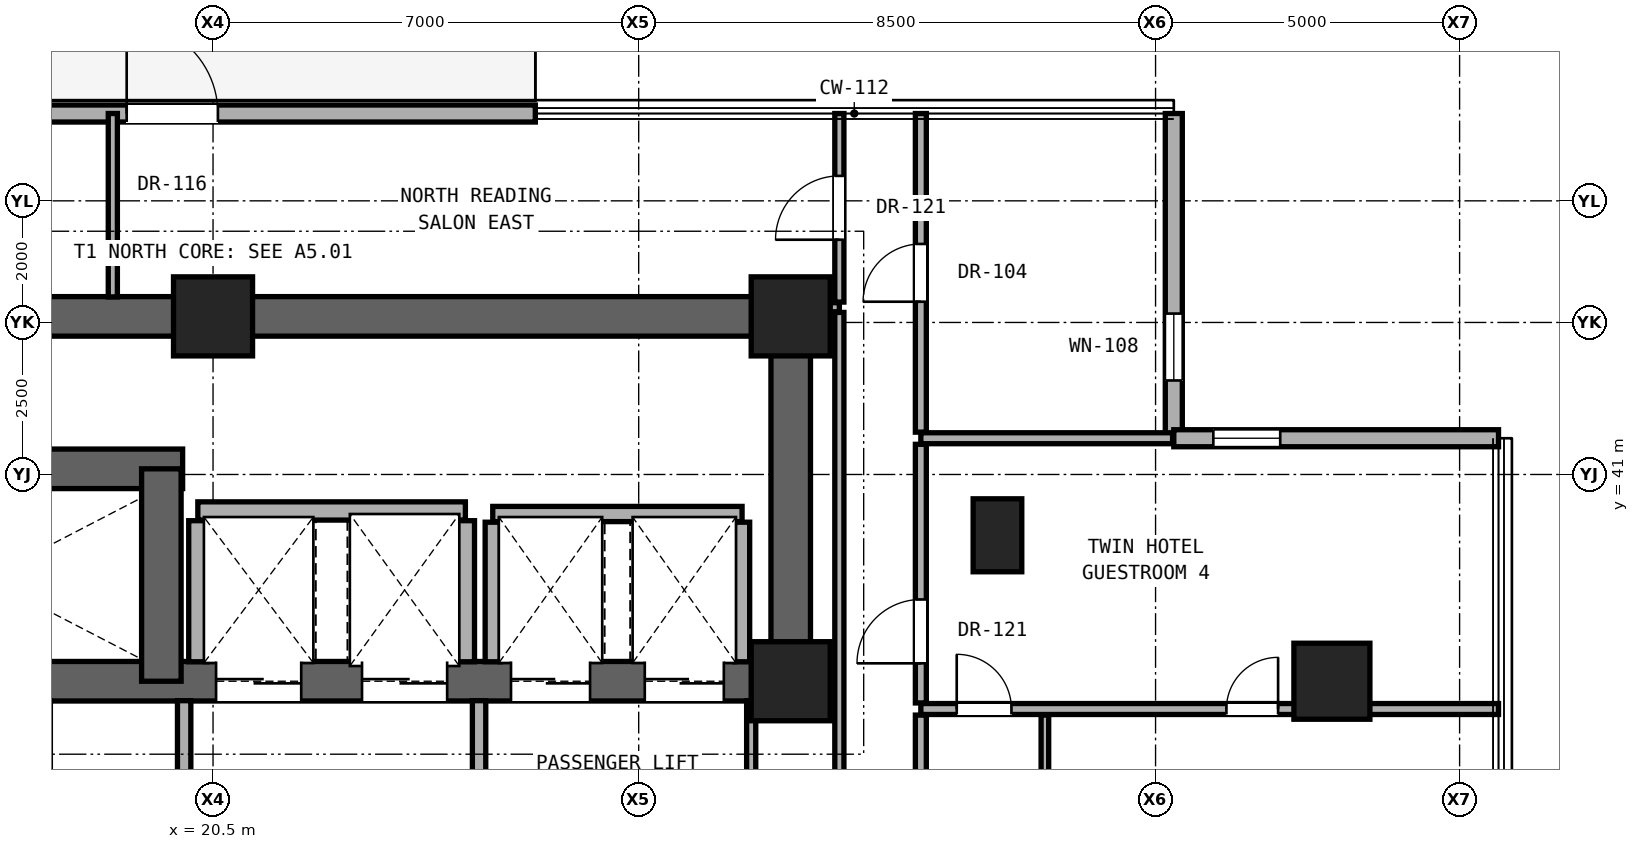
"""IFC4 building model, lengths in metres.
Left out: names, types, materials, properties, quantities, classifications, styles, units other than length and angle.
Written with IfcOpenShell. Run it as: python <this file> out.ifc"""

import sys

from ifc_helpers import new_model, si_unit, direction, frame, frame_2d, origin, origin_2d, place, context, subcontext, project, spatial, rectangle, hollow_rectangle, extrude, element, fill, save


model = new_model("IFC4")
c1 = context("Model", 3, precision=1e-05, world=origin(), true_north=direction((0.0, 1.0)))
c2 = subcontext(c1, "Body", "Model", "MODEL_VIEW")
j1 = project(units=[si_unit("LENGTHUNIT", "METRE"), si_unit("PLANEANGLEUNIT", "RADIAN")], contexts=[c1])
p1 = place(None, origin())
s1 = spatial("IfcSite", under=j1, at=p1, CompositionType="ELEMENT")
p2 = place(p1, origin())
s2 = spatial("IfcBuilding", under=s1, at=p2, CompositionType="ELEMENT")
p3 = place(p2, frame((0.0, 0.0, 58.7)))
s3 = spatial("IfcBuildingStorey", under=s2, at=p3, CompositionType="ELEMENT", Elevation=58.7)
for number, where, z_axis, x_axis in (
    (1, (30.0, 37.6, 0.0), (0.0, 0.0, 1.0), (1.0, 0.0, 0.0)),
    (2, (20.5, 43.6, 0.0), (0.0, 0.0, 1.0), (1.0, 0.0, 0.0)),
    (3, (30.0, 43.6, 0.0), (0.0, 0.0, 1.0), (1.0, 0.0, 0.0)),
):
    element("IfcColumn", number, at=place(p3, frame(where, z_axis=z_axis, x_axis=x_axis)), inside=s3, PredefinedType="COLUMN", context=c2, shape_type="SweptSolid", body=[
        extrude(rectangle(XDim=1.3, YDim=1.3, at=origin_2d()), origin(), (0.0, 0.0, 1.0), 3.3),
    ])
p4 = place(p3, frame((38.9, 37.6, 0.0), z_axis=(0.0, 0.0, 1.0), x_axis=(1.0, 0.0, 0.0)))
e4 = element("IfcColumn", 4, at=p4, inside=s3, PredefinedType="COLUMN", context=c2, shape_type="SweptSolid", body=[
    extrude(hollow_rectangle(XDim=1.25, YDim=1.25, WallThickness=0.07, at=origin_2d()), origin(), (0.0, 0.0, 1.0), 3.3),
])
p5 = place(p3, frame((33.4, 40.0, 0.0), z_axis=(0.0, 0.0, 1.0), x_axis=(1.0, 0.0, 0.0)))
e5 = element("IfcColumn", 5, at=p5, inside=s3, PredefinedType="PILASTER", context=c2, shape_type="SweptSolid", body=[
    extrude(rectangle(XDim=0.8, YDim=1.2, at=origin_2d()), origin(), (0.0, 0.0, 1.0), 3.3),
])
p6 = place(p3, frame((11.0, 43.6, 0.0), z_axis=(0.0, 0.0, 1.0), x_axis=(1.0, 0.0, 0.0)))
e6 = element("IfcWall", 6, at=p6, inside=s3, PredefinedType="SHEAR", context=c2, shape_type="SweptSolid", body=[
    extrude(rectangle(XDim=19.0, YDim=0.65, at=frame_2d((9.5, 0.0))), origin(), (0.0, 0.0, 1.0), 3.06),
])
p7 = place(p3, frame((30.0, 37.6, 0.0), z_axis=(0.0, 0.0, 1.0), x_axis=(0.0, 1.0, 0.0)))
e7 = element("IfcWall", 7, at=p7, inside=s3, PredefinedType="SHEAR", context=c2, shape_type="SweptSolid", body=[
    extrude(rectangle(XDim=6.0, YDim=0.65, at=frame_2d((3.0, 0.0))), origin(), (0.0, 0.0, 1.0), 3.06),
])
p8 = place(p3, frame((11.0, 37.6, 0.0), z_axis=(0.0, 0.0, 1.0), x_axis=(1.0, 0.0, 0.0)))
e8 = element("IfcWall", 8, at=p8, inside=s3, PredefinedType="SHEAR", context=c2, shape_type="SweptSolid", body=[
    extrude(rectangle(XDim=19.0, YDim=0.65, at=frame_2d((9.5, 0.0))), origin(), (0.0, 0.0, 1.0), 3.06),
])
p9 = place(p8, frame((1.06, 0.0, 0.0)))
e9 = element("IfcOpeningElement", 9, at=p9, cuts=e8, PredefinedType="OPENING", context=c2, shape_type="SweptSolid", body=[
    extrude(rectangle(XDim=1.15, YDim=2.2, at=frame_2d((0.575, 1.1))), frame((0.0, 0.335, 0.0), z_axis=(0.0, -1.0, 0.0), x_axis=(1.0, 0.0, 0.0)), (0.0, 0.0, 1.0), 0.67),
])
p10 = place(p8, frame((9.55, 0.0, 0.0)))
e10 = element("IfcOpeningElement", 10, at=p10, cuts=e8, PredefinedType="OPENING", context=c2, shape_type="SweptSolid", body=[
    extrude(rectangle(XDim=1.4, YDim=2.35, at=frame_2d((0.7, 1.175))), frame((0.0, 0.335, 0.0), z_axis=(0.0, -1.0, 0.0), x_axis=(1.0, 0.0, 0.0)), (0.0, 0.0, 1.0), 0.67),
])
p11 = place(p8, frame((11.95, 0.0, 0.0)))
e11 = element("IfcOpeningElement", 11, at=p11, cuts=e8, PredefinedType="OPENING", context=c2, shape_type="SweptSolid", body=[
    extrude(rectangle(XDim=1.4, YDim=2.35, at=frame_2d((0.7, 1.175))), frame((0.0, 0.335, 0.0), z_axis=(0.0, -1.0, 0.0), x_axis=(1.0, 0.0, 0.0)), (0.0, 0.0, 1.0), 0.67),
])
p12 = place(p8, frame((14.4, 0.0, 0.0)))
e12 = element("IfcOpeningElement", 12, at=p12, cuts=e8, PredefinedType="OPENING", context=c2, shape_type="SweptSolid", body=[
    extrude(rectangle(XDim=1.3, YDim=2.3, at=frame_2d((0.65, 1.15))), frame((0.0, 0.335, 0.0), z_axis=(0.0, -1.0, 0.0), x_axis=(1.0, 0.0, 0.0)), (0.0, 0.0, 1.0), 0.67),
])
p13 = place(p8, frame((16.6, 0.0, 0.0)))
e13 = element("IfcOpeningElement", 13, at=p13, cuts=e8, PredefinedType="OPENING", context=c2, shape_type="SweptSolid", body=[
    extrude(rectangle(XDim=1.3, YDim=2.3, at=frame_2d((0.65, 1.15))), frame((0.0, 0.335, 0.0), z_axis=(0.0, -1.0, 0.0), x_axis=(1.0, 0.0, 0.0)), (0.0, 0.0, 1.0), 0.67),
])
p14 = place(p3, frame((11.0, 41.093, 0.0), z_axis=(0.0, 0.0, 1.0), x_axis=(1.0, 0.0, 0.0)))
e14 = element("IfcWall", 14, at=p14, inside=s3, PredefinedType="SHEAR", context=c2, shape_type="SweptSolid", body=[
    extrude(rectangle(XDim=9.0, YDim=0.65, at=frame_2d((4.5, 0.0))), origin(), (0.0, 0.0, 1.0), 3.06),
])
p15 = place(p3, frame((19.65, 37.6, 0.0), z_axis=(0.0, 0.0, 1.0), x_axis=(0.0, 1.0, 0.0)))
e15 = element("IfcWall", 15, at=p15, inside=s3, PredefinedType="SHEAR", context=c2, shape_type="SweptSolid", body=[
    extrude(rectangle(XDim=3.493, YDim=0.65, at=frame_2d((1.747, 0.0))), origin(), (0.0, 0.0, 1.0), 3.06),
])
p16 = place(p3, frame((15.2, 46.936, 0.0), z_axis=(0.0, 0.0, 1.0), x_axis=(1.0, 0.0, 0.0)))
e16 = element("IfcWall", 16, at=p16, inside=s3, PredefinedType="SOLIDWALL", context=c2, shape_type="SweptSolid", body=[
    extrude(rectangle(XDim=10.6, YDim=0.28, at=frame_2d((5.3, 0.0))), origin(), (0.0, 0.0, 1.0), 3.02),
])
p17 = place(p16, frame((0.55, 0.0, 0.67)))
e17 = element("IfcOpeningElement", 17, at=p17, cuts=e16, PredefinedType="OPENING", context=c2, shape_type="SweptSolid", body=[
    extrude(rectangle(XDim=1.65, YDim=2.2, at=frame_2d((0.825, 1.1))), frame((0.0, 0.15, 0.0), z_axis=(0.0, -1.0, 0.0), x_axis=(1.0, 0.0, 0.0)), (0.0, 0.0, 1.0), 0.3),
])
p18 = place(p16, frame((3.88, 0.0, 0.0)))
e18 = element("IfcOpeningElement", 18, at=p18, cuts=e16, PredefinedType="OPENING", context=c2, shape_type="SweptSolid", body=[
    extrude(rectangle(XDim=1.5, YDim=2.3, at=frame_2d((0.75, 1.15))), frame((0.0, 0.15, 0.0), z_axis=(0.0, -1.0, 0.0), x_axis=(1.0, 0.0, 0.0)), (0.0, 0.0, 1.0), 0.3),
])
p19 = place(p3, frame((36.3, 41.596, 0.0), z_axis=(0.0, 0.0, 1.0), x_axis=(0.0, 1.0, 0.0)))
e19 = element("IfcWall", 19, at=p19, inside=s3, PredefinedType="SOLIDWALL", context=c2, shape_type="SweptSolid", body=[
    extrude(rectangle(XDim=5.34, YDim=0.28, at=frame_2d((2.67, 0.0))), origin(), (0.0, 0.0, 1.0), 3.04),
])
p20 = place(p19, frame((0.95, 0.0, 0.85)))
e20 = element("IfcOpeningElement", 20, at=p20, cuts=e19, PredefinedType="OPENING", context=c2, shape_type="SweptSolid", body=[
    extrude(rectangle(XDim=1.1, YDim=2.0, at=frame_2d((0.55, 1.0))), frame((0.0, 0.15, 0.0), z_axis=(0.0, -1.0, 0.0), x_axis=(1.0, 0.0, 0.0)), (0.0, 0.0, 1.0), 0.3),
])
p21 = place(p3, frame((41.64, 41.596, 0.0), z_axis=(0.0, 0.0, 1.0), x_axis=(-1.0, 0.0, 0.0)))
e21 = element("IfcWall", 21, at=p21, inside=s3, PredefinedType="SOLIDWALL", context=c2, shape_type="SweptSolid", body=[
    extrude(rectangle(XDim=5.34, YDim=0.28, at=frame_2d((2.67, 0.0))), origin(), (0.0, 0.0, 1.0), 3.04),
])
p22 = place(p21, frame((3.59, 0.0, 0.85)))
e22 = element("IfcOpeningElement", 22, at=p22, cuts=e21, PredefinedType="OPENING", context=c2, shape_type="SweptSolid", body=[
    extrude(rectangle(XDim=1.1, YDim=2.0, at=frame_2d((0.55, 1.0))), frame((0.0, 0.15, 0.0), z_axis=(0.0, -1.0, 0.0), x_axis=(1.0, 0.0, 0.0)), (0.0, 0.0, 1.0), 0.3),
])
p23 = place(p3, frame((32.14, 37.143, 0.0), z_axis=(0.0, 0.0, 1.0), x_axis=(1.0, 0.0, 0.0)))
e23 = element("IfcWall", 23, at=p23, inside=s3, PredefinedType="PARTITIONING", context=c2, shape_type="SweptSolid", body=[
    extrude(rectangle(XDim=9.5, YDim=0.18, at=frame_2d((4.75, 0.0))), origin(), (0.0, 0.0, 1.0), 2.125),
])
p24 = place(p23, frame((5.025, 0.0, 0.0)))
e24 = element("IfcOpeningElement", 24, at=p24, cuts=e23, PredefinedType="OPENING", context=c2, shape_type="SweptSolid", body=[
    extrude(rectangle(XDim=0.85, YDim=2.01, at=frame_2d((0.425, 1.005))), frame((0.0, 0.1, 0.0), z_axis=(0.0, -1.0, 0.0), x_axis=(1.0, 0.0, 0.0)), (0.0, 0.0, 1.0), 0.2),
])
p25 = place(p23, frame((0.59, 0.0, 0.0)))
e25 = element("IfcOpeningElement", 25, at=p25, cuts=e23, PredefinedType="OPENING", context=c2, shape_type="SweptSolid", body=[
    extrude(rectangle(XDim=0.9, YDim=2.1, at=frame_2d((0.45, 1.05))), frame((0.0, 0.1, 0.0), z_axis=(0.0, -1.0, 0.0), x_axis=(1.0, 0.0, 0.0)), (0.0, 0.0, 1.0), 0.2),
])
p26 = place(p3, frame((25.1, 40.35, 0.0), z_axis=(0.0, 0.0, 1.0), x_axis=(1.0, 0.0, 0.0)))
e26 = element("IfcWall", 26, at=p26, inside=s3, PredefinedType="SOLIDWALL", context=c2, shape_type="SweptSolid", body=[
    extrude(rectangle(XDim=4.1, YDim=0.25, at=frame_2d((2.05, 0.0))), origin(), (0.0, 0.0, 1.0), 3.06),
])
p27 = place(p3, frame((20.25, 40.4, 0.0), z_axis=(0.0, 0.0, 1.0), x_axis=(1.0, 0.0, 0.0)))
e27 = element("IfcWall", 27, at=p27, inside=s3, PredefinedType="SOLIDWALL", context=c2, shape_type="SweptSolid", body=[
    extrude(rectangle(XDim=4.4, YDim=0.3, at=frame_2d((2.2, 0.0))), origin(), (0.0, 0.0, 1.0), 3.06),
])
p28 = place(p3, frame((32.14, 41.596, 0.0), z_axis=(0.0, 0.0, 1.0), x_axis=(1.0, 0.0, 0.0)))
e28 = element("IfcWall", 28, at=p28, inside=s3, PredefinedType="PARTITIONING", context=c2, shape_type="SweptSolid", body=[
    extrude(rectangle(XDim=4.14, YDim=0.18, at=frame_2d((2.07, 0.0))), origin(), (0.0, 0.0, 1.0), 3.06),
])
p29 = place(p3, frame((30.32, 43.75, 0.0), z_axis=(0.0, 0.0, 1.0), x_axis=(1.0, 0.0, 0.0)))
e29 = element("IfcWall", 29, at=p29, inside=s3, PredefinedType="PARTITIONING", context=c2, shape_type="SweptSolid", body=[
    extrude(rectangle(XDim=0.48, YDim=0.15, at=frame_2d((0.24, 0.0))), origin(), (0.0, 0.0, 1.0), 3.06),
])
p30 = place(p3, frame((18.852, 43.92, 0.0), z_axis=(0.0, 0.0, 1.0), x_axis=(0.0, 1.0, 0.0)))
e30 = element("IfcWall", 30, at=p30, inside=s3, PredefinedType="PARTITIONING", context=c2, shape_type="SweptSolid", body=[
    extrude(rectangle(XDim=3.016, YDim=0.15, at=frame_2d((1.508, 0.0))), origin(), (0.0, 0.0, 1.0), 3.06),
])
p31 = place(p3, frame((20.025, 34.57, 0.0), z_axis=(0.0, 0.0, 1.0), x_axis=(0.0, 1.0, 0.0)))
e31 = element("IfcWall", 31, at=p31, inside=s3, PredefinedType="SOLIDWALL", context=c2, shape_type="SweptSolid", body=[
    extrude(rectangle(XDim=2.71, YDim=0.22, at=frame_2d((1.355, 0.0))), origin(), (0.0, 0.0, 1.0), 3.06),
])
for number, where, z_axis, x_axis in (
    (32, (20.25, 37.92, 0.0), (0.0, 0.0, 1.0), (0.0, 1.0, 0.0)),
    (33, (24.65, 37.92, 0.0), (0.0, 0.0, 1.0), (0.0, 1.0, 0.0)),
):
    element("IfcWall", number, at=place(p3, frame(where, z_axis=z_axis, x_axis=x_axis)), inside=s3, PredefinedType="SOLIDWALL", context=c2, shape_type="SweptSolid", body=[
        extrude(rectangle(XDim=2.32, YDim=0.3, at=frame_2d((1.16, 0.0))), origin(), (0.0, 0.0, 1.0), 3.06),
    ])
p32 = place(p3, frame((24.875, 34.57, 0.0), z_axis=(0.0, 0.0, 1.0), x_axis=(0.0, 1.0, 0.0)))
e34 = element("IfcWall", 34, at=p32, inside=s3, PredefinedType="SOLIDWALL", context=c2, shape_type="SweptSolid", body=[
    extrude(rectangle(XDim=2.71, YDim=0.22, at=frame_2d((1.355, 0.0))), origin(), (0.0, 0.0, 1.0), 3.06),
])
p33 = place(p3, frame((25.1, 37.92, 0.0), z_axis=(0.0, 0.0, 1.0), x_axis=(0.0, 1.0, 0.0)))
e35 = element("IfcWall", 35, at=p33, inside=s3, PredefinedType="SOLIDWALL", context=c2, shape_type="SweptSolid", body=[
    extrude(rectangle(XDim=2.295, YDim=0.25, at=frame_2d((1.147, 0.0))), origin(), (0.0, 0.0, 1.0), 3.06),
])
p34 = place(p3, frame((29.35, 34.57, 0.0), z_axis=(0.0, 0.0, 1.0), x_axis=(0.0, 1.0, 0.0)))
e36 = element("IfcWall", 36, at=p34, inside=s3, PredefinedType="PARTITIONING", context=c2, shape_type="SweptSolid", body=[
    extrude(rectangle(XDim=2.71, YDim=0.15, at=frame_2d((1.355, 0.0))), origin(), (0.0, 0.0, 1.0), 3.06),
])
p35 = place(p3, frame((29.2, 37.92, 0.0), z_axis=(0.0, 0.0, 1.0), x_axis=(0.0, 1.0, 0.0)))
e37 = element("IfcWall", 37, at=p35, inside=s3, PredefinedType="SOLIDWALL", context=c2, shape_type="SweptSolid", body=[
    extrude(rectangle(XDim=2.295, YDim=0.25, at=frame_2d((1.147, 0.0))), origin(), (0.0, 0.0, 1.0), 3.06),
])
p36 = place(p3, frame((30.8, 34.57, 0.0), z_axis=(0.0, 0.0, 1.0), x_axis=(0.0, 1.0, 0.0)))
e38 = element("IfcWall", 38, at=p36, inside=s3, PredefinedType="PARTITIONING", context=c2, shape_type="SweptSolid", body=[
    extrude(rectangle(XDim=9.095, YDim=0.15, at=frame_2d((4.547, 0.0))), origin(), (0.0, 0.0, 1.0), 2.436),
])
p37 = place(p3, frame((30.8, 43.835, 0.0), z_axis=(0.0, 0.0, 1.0), x_axis=(0.0, 1.0, 0.0)))
e39 = element("IfcWall", 39, at=p37, inside=s3, PredefinedType="PARTITIONING", context=c2, shape_type="SweptSolid", body=[
    extrude(rectangle(XDim=3.101, YDim=0.15, at=frame_2d((1.551, 0.0))), origin(), (0.0, 0.0, 1.0), 3.06),
])
p38 = place(p37, frame((1.025, 0.0, 0.0)))
e40 = element("IfcOpeningElement", 40, at=p38, cuts=e39, PredefinedType="OPENING", context=c2, shape_type="SweptSolid", body=[
    extrude(rectangle(XDim=1.05, YDim=2.2, at=frame_2d((0.525, 1.1))), frame((0.0, 0.085, 0.0), z_axis=(0.0, -1.0, 0.0), x_axis=(1.0, 0.0, 0.0)), (0.0, 0.0, 1.0), 0.17),
])
p39 = place(p3, frame((32.14, 34.496, 0.0), z_axis=(0.0, 0.0, 1.0), x_axis=(0.0, 1.0, 0.0)))
e41 = element("IfcWall", 41, at=p39, inside=s3, PredefinedType="PARTITIONING", context=c2, shape_type="SweptSolid", body=[
    extrude(rectangle(XDim=2.547, YDim=0.18, at=frame_2d((1.274, 0.0))), origin(), (0.0, 0.0, 1.0), 3.06),
])
p40 = place(p3, frame((32.14, 37.243, 0.0), z_axis=(0.0, 0.0, 1.0), x_axis=(0.0, 1.0, 0.0)))
e42 = element("IfcWall", 42, at=p40, inside=s3, PredefinedType="PARTITIONING", context=c2, shape_type="SweptSolid", body=[
    extrude(rectangle(XDim=4.253, YDim=0.18, at=frame_2d((2.126, 0.0))), origin(), (0.0, 0.0, 1.0), 2.436),
])
p41 = place(p40, frame((0.652, 0.0, 0.0)))
e43 = element("IfcOpeningElement", 43, at=p41, cuts=e42, PredefinedType="OPENING", context=c2, shape_type="SweptSolid", body=[
    extrude(rectangle(XDim=1.05, YDim=2.2, at=frame_2d((0.525, 1.1))), frame((0.0, 0.1, 0.0), z_axis=(0.0, -1.0, 0.0), x_axis=(1.0, 0.0, 0.0)), (0.0, 0.0, 1.0), 0.2),
])
p42 = place(p3, frame((32.14, 41.696, 0.0), z_axis=(0.0, 0.0, 1.0), x_axis=(0.0, 1.0, 0.0)))
e44 = element("IfcWall", 44, at=p42, inside=s3, PredefinedType="PARTITIONING", context=c2, shape_type="SweptSolid", body=[
    extrude(rectangle(XDim=5.24, YDim=0.18, at=frame_2d((2.62, 0.0))), origin(), (0.0, 0.0, 1.0), 3.06),
])
p43 = place(p42, frame((2.145, 0.0, 0.0)))
e45 = element("IfcOpeningElement", 45, at=p43, cuts=e44, PredefinedType="OPENING", context=c2, shape_type="SweptSolid", body=[
    extrude(rectangle(XDim=0.95, YDim=2.15, at=frame_2d((0.475, 1.075))), frame((0.0, 0.1, 0.0), z_axis=(0.0, -1.0, 0.0), x_axis=(1.0, 0.0, 0.0)), (0.0, 0.0, 1.0), 0.2),
])
p44 = place(p3, frame((34.18, 34.496, 0.0), z_axis=(0.0, 0.0, 1.0), x_axis=(0.0, 1.0, 0.0)))
e46 = element("IfcWall", 46, at=p44, inside=s3, PredefinedType="PARTITIONING", context=c2, shape_type="SweptSolid", body=[
    extrude(rectangle(XDim=2.547, YDim=0.125, at=frame_2d((1.274, 0.0))), origin(), (0.0, 0.0, 1.0), 3.06),
])
p45 = place(p18, origin())
e47 = element("IfcDoor", 47, at=p45, inside=s3, OperationType="SINGLE_SWING_LEFT", PredefinedType="DOOR", context=c2, shape_type="SweptSolid", body=[
    extrude(rectangle(XDim=1.5, YDim=2.3, at=frame_2d((0.75, 1.15))), frame((0.0, 0.025, 0.0), z_axis=(0.0, -1.0, 0.0), x_axis=(1.0, 0.0, 0.0)), (0.0, 0.0, 1.0), 0.05),
])
fill(e18, e47)
p46 = place(p20, origin())
e48 = element("IfcWindow", 48, at=p46, inside=s3, PartitioningType="SINGLE_PANEL", PredefinedType="WINDOW", context=c2, shape_type="SweptSolid", body=[
    extrude(rectangle(XDim=1.1, YDim=2.0, at=frame_2d((0.55, 1.0))), frame((0.0, 0.03, 0.0), z_axis=(0.0, -1.0, 0.0), x_axis=(1.0, 0.0, 0.0)), (0.0, 0.0, 1.0), 0.06),
])
fill(e20, e48)
p47 = place(p22, origin())
e49 = element("IfcWindow", 49, at=p47, inside=s3, PartitioningType="SINGLE_PANEL", PredefinedType="WINDOW", context=c2, shape_type="SweptSolid", body=[
    extrude(rectangle(XDim=1.1, YDim=2.0, at=frame_2d((0.55, 1.0))), frame((0.0, 0.03, 0.0), z_axis=(0.0, -1.0, 0.0), x_axis=(1.0, 0.0, 0.0)), (0.0, 0.0, 1.0), 0.06),
])
fill(e22, e49)
p48 = place(p41, origin())
e50 = element("IfcDoor", 50, at=p48, inside=s3, OperationType="SINGLE_SWING_LEFT", PredefinedType="DOOR", context=c2, shape_type="SweptSolid", body=[
    extrude(rectangle(XDim=1.05, YDim=2.2, at=frame_2d((0.525, 1.1))), frame((0.0, 0.025, 0.0), z_axis=(0.0, -1.0, 0.0), x_axis=(1.0, 0.0, 0.0)), (0.0, 0.0, 1.0), 0.05),
])
fill(e43, e50)
p49 = place(p24, origin())
e51 = element("IfcDoor", 51, at=p49, inside=s3, OperationType="SINGLE_SWING_RIGHT", PredefinedType="DOOR", context=c2, shape_type="SweptSolid", body=[
    extrude(rectangle(XDim=0.85, YDim=2.01, at=frame_2d((0.425, 1.005))), frame((0.0, 0.025, 0.0), z_axis=(0.0, -1.0, 0.0), x_axis=(1.0, 0.0, 0.0)), (0.0, 0.0, 1.0), 0.05),
])
fill(e24, e51)
p50 = place(p25, origin())
e52 = element("IfcDoor", 52, at=p50, inside=s3, OperationType="SINGLE_SWING_LEFT", PredefinedType="DOOR", context=c2, shape_type="SweptSolid", body=[
    extrude(rectangle(XDim=0.9, YDim=2.1, at=frame_2d((0.45, 1.05))), frame((0.0, 0.025, 0.0), z_axis=(0.0, -1.0, 0.0), x_axis=(1.0, 0.0, 0.0)), (0.0, 0.0, 1.0), 0.05),
])
fill(e25, e52)
p51 = place(p38, origin())
e53 = element("IfcDoor", 53, at=p51, inside=s3, OperationType="SINGLE_SWING_LEFT", PredefinedType="DOOR", context=c2, shape_type="SweptSolid", body=[
    extrude(rectangle(XDim=1.05, YDim=2.2, at=frame_2d((0.525, 1.1))), frame((0.0, 0.025, 0.0), z_axis=(0.0, -1.0, 0.0), x_axis=(1.0, 0.0, 0.0)), (0.0, 0.0, 1.0), 0.05),
])
fill(e40, e53)
p52 = place(p43, origin())
e54 = element("IfcDoor", 54, at=p52, inside=s3, OperationType="SINGLE_SWING_LEFT", PredefinedType="DOOR", context=c2, shape_type="SweptSolid", body=[
    extrude(rectangle(XDim=0.95, YDim=2.15, at=frame_2d((0.475, 1.075))), frame((0.0, 0.025, 0.0), z_axis=(0.0, -1.0, 0.0), x_axis=(1.0, 0.0, 0.0)), (0.0, 0.0, 1.0), 0.05),
])
fill(e45, e54)
p53 = place(p10, origin())
e55 = element("IfcDoor", 55, at=p53, inside=s3, OperationType="DOUBLE_DOOR_SLIDING", PredefinedType="DOOR", context=c2, shape_type="SweptSolid", body=[
    extrude(rectangle(XDim=1.4, YDim=2.35, at=frame_2d((0.7, 1.175))), frame((0.0, 0.025, 0.0), z_axis=(0.0, -1.0, 0.0), x_axis=(1.0, 0.0, 0.0)), (0.0, 0.0, 1.0), 0.05),
])
fill(e10, e55)
p54 = place(p11, origin())
e56 = element("IfcDoor", 56, at=p54, inside=s3, OperationType="DOUBLE_DOOR_SLIDING", PredefinedType="DOOR", context=c2, shape_type="SweptSolid", body=[
    extrude(rectangle(XDim=1.4, YDim=2.35, at=frame_2d((0.7, 1.175))), frame((0.0, 0.025, 0.0), z_axis=(0.0, -1.0, 0.0), x_axis=(1.0, 0.0, 0.0)), (0.0, 0.0, 1.0), 0.05),
])
fill(e11, e56)
p55 = place(p12, origin())
e57 = element("IfcDoor", 57, at=p55, inside=s3, OperationType="DOUBLE_DOOR_SLIDING", PredefinedType="DOOR", context=c2, shape_type="SweptSolid", body=[
    extrude(rectangle(XDim=1.3, YDim=2.3, at=frame_2d((0.65, 1.15))), frame((0.0, 0.025, 0.0), z_axis=(0.0, -1.0, 0.0), x_axis=(1.0, 0.0, 0.0)), (0.0, 0.0, 1.0), 0.05),
])
fill(e12, e57)
p56 = place(p13, origin())
e58 = element("IfcDoor", 58, at=p56, inside=s3, OperationType="DOUBLE_DOOR_SLIDING", PredefinedType="DOOR", context=c2, shape_type="SweptSolid", body=[
    extrude(rectangle(XDim=1.3, YDim=2.3, at=frame_2d((0.65, 1.15))), frame((0.0, 0.025, 0.0), z_axis=(0.0, -1.0, 0.0), x_axis=(1.0, 0.0, 0.0)), (0.0, 0.0, 1.0), 0.05),
])
fill(e13, e58)
save(model, sys.argv[1])
